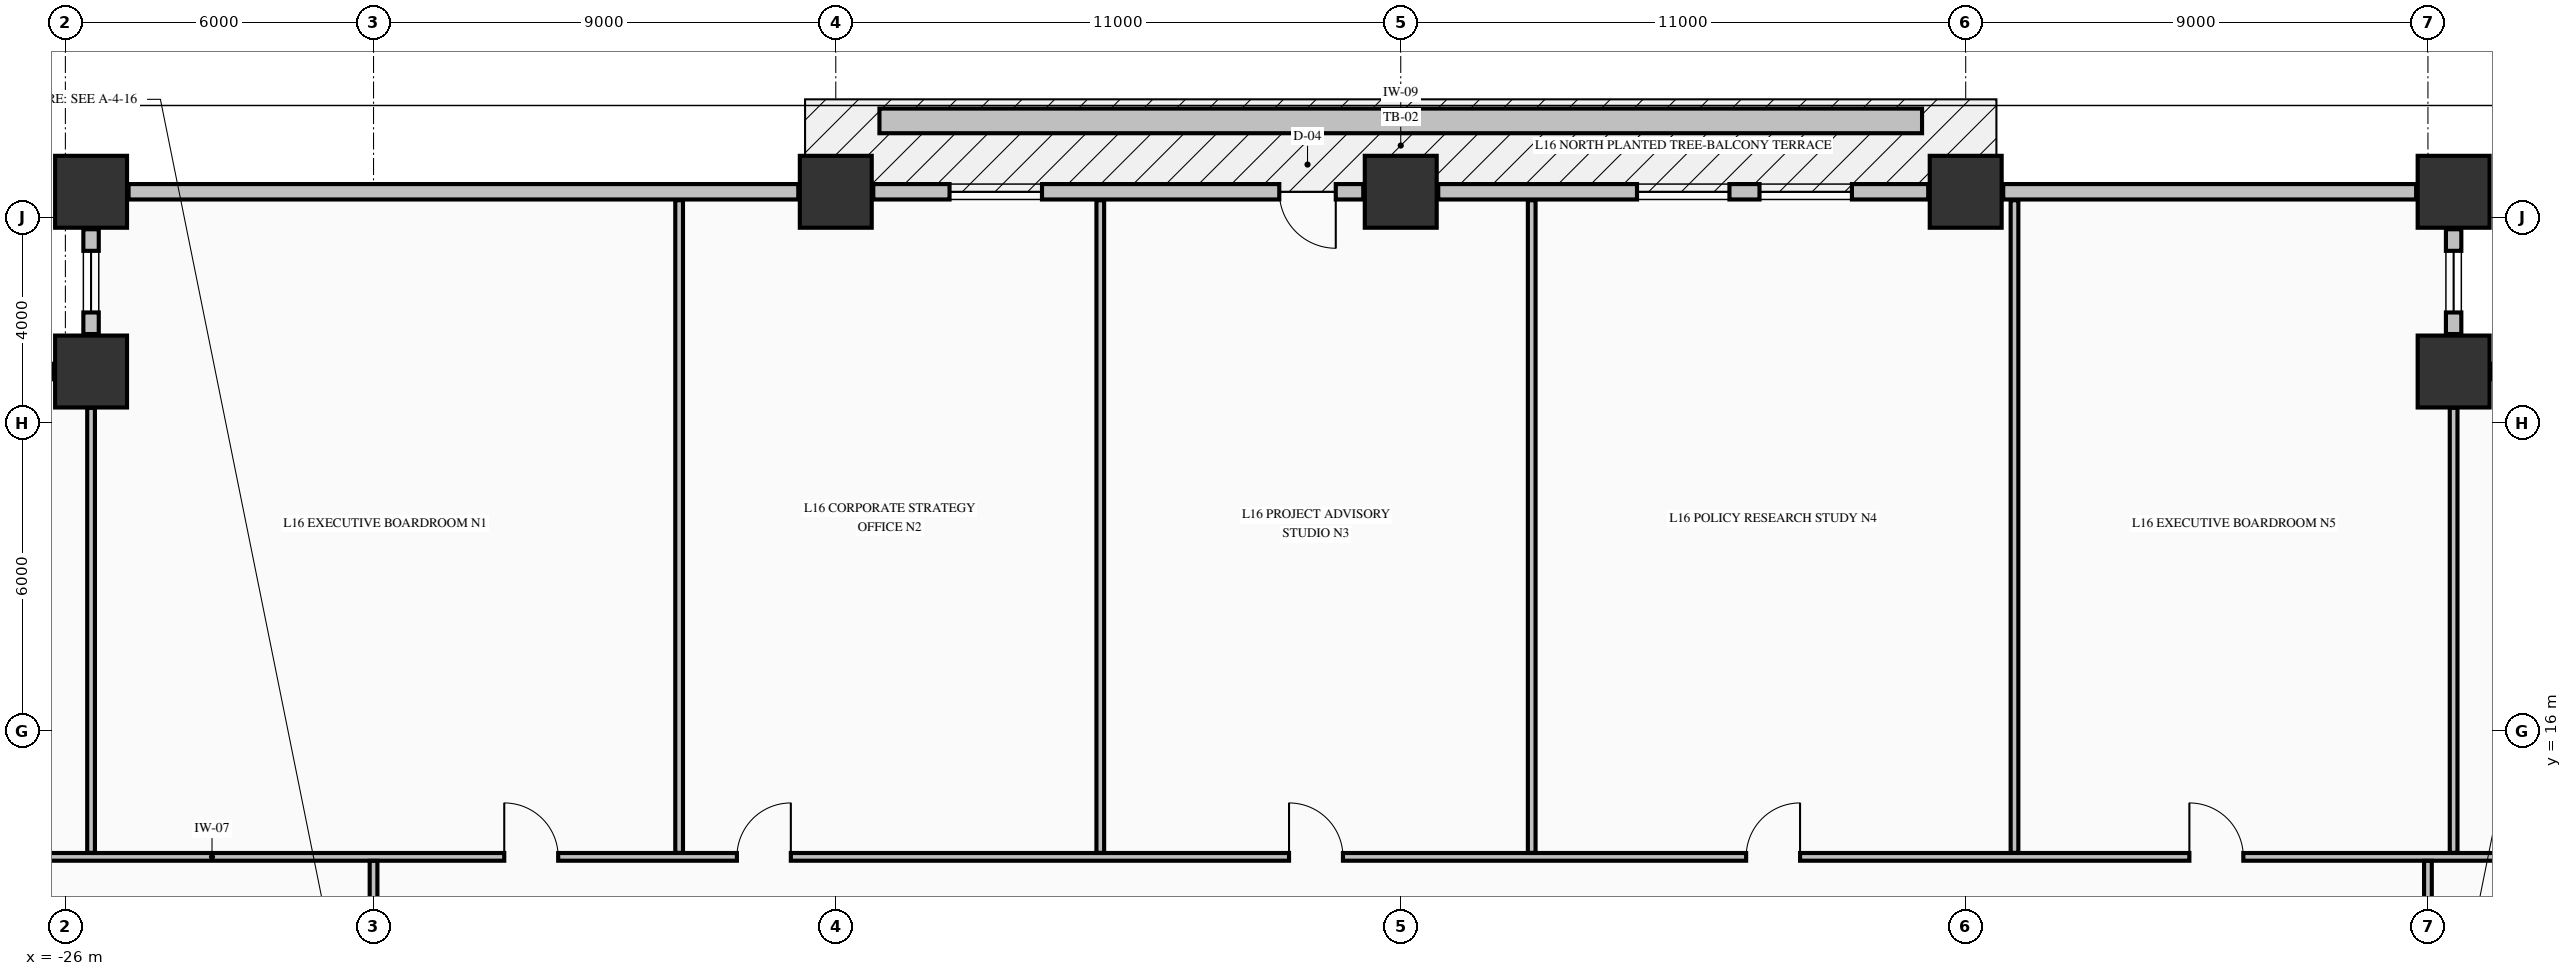
"""IFC4 building model, lengths in metres.
Left out: names, types, materials, properties, quantities, classifications, styles, units other than length and angle.
Written with IfcOpenShell. Run it as: python <this file> out.ifc"""

import sys

from ifc_helpers import new_model, si_unit, direction, frame, frame_2d, origin, origin_2d, place, context, subcontext, project, spatial, rectangle, extrude, element, fill, save


model = new_model("IFC4")
c1 = context("Model", 3, precision=1e-05, world=origin(), true_north=direction((0.0, 1.0)))
c2 = subcontext(c1, "Body", "Model", "MODEL_VIEW")
j1 = project(units=[si_unit("LENGTHUNIT", "METRE"), si_unit("PLANEANGLEUNIT", "RADIAN")], contexts=[c1])
p1 = place(None, origin())
s1 = spatial("IfcSite", under=j1, at=p1, CompositionType="ELEMENT")
p2 = place(p1, origin())
s2 = spatial("IfcBuilding", under=s1, at=p2, CompositionType="ELEMENT")
p3 = place(p2, frame((0.0, 0.0, 67.9)))
s3 = spatial("IfcBuildingStorey", under=s2, at=p3, CompositionType="ELEMENT", Elevation=67.9)
for number, where, z_axis, x_axis in (
    (1, (-25.5, 26.5, -0.25), (0.0, 0.0, 1.0), (1.0, 0.0, 0.0)),
    (2, (-11.0, 26.5, -0.25), (0.0, 0.0, 1.0), (1.0, 0.0, 0.0)),
    (3, (0.0, 26.5, -0.25), (0.0, 0.0, 1.0), (1.0, 0.0, 0.0)),
    (4, (11.0, 26.5, -0.25), (0.0, 0.0, 1.0), (1.0, 0.0, 0.0)),
    (5, (20.5, 26.5, -0.25), (0.0, 0.0, 1.0), (1.0, 0.0, 0.0)),
    (6, (20.5, 23.0, -0.25), (0.0, 0.0, 1.0), (1.0, 0.0, 0.0)),
    (7, (-25.5, 23.0, -0.25), (0.0, 0.0, 1.0), (1.0, 0.0, 0.0)),
):
    element("IfcColumn", number, at=place(p3, frame(where, z_axis=z_axis, x_axis=x_axis)), inside=s3, PredefinedType="COLUMN", context=c2, shape_type="SweptSolid", body=[
        extrude(rectangle(XDim=1.4, YDim=1.4, at=origin_2d()), origin(), (0.0, 0.0, 1.0), 3.495),
    ])
p4 = place(p3, frame((23.27, 23.0, 0.0), z_axis=(0.0, 0.0, 1.0), x_axis=(-1.0, 0.0, 0.0)))
e8 = element("IfcWall", 8, at=p4, inside=s3, PredefinedType="STANDARD", context=c2, shape_type="SweptSolid", body=[
    extrude(rectangle(XDim=2.04, YDim=0.3, at=frame_2d((1.02, 0.0))), origin(), (0.0, 0.0, 1.0), 2.637),
])
p5 = place(p4, frame((0.42, 0.0, 0.82)))
e9 = element("IfcOpeningElement", 9, at=p5, cuts=e8, PredefinedType="OPENING", context=c2, shape_type="SweptSolid", body=[
    extrude(rectangle(XDim=1.2, YDim=1.65, at=frame_2d((0.6, 0.825))), frame((0.0, 0.16, 0.0), z_axis=(0.0, -1.0, 0.0), x_axis=(1.0, 0.0, 0.0)), (0.0, 0.0, 1.0), 0.32),
])
p6 = place(p3, frame((20.5, 23.73, 0.0), z_axis=(0.0, 0.0, 1.0), x_axis=(0.0, 1.0, 0.0)))
e10 = element("IfcWall", 10, at=p6, inside=s3, PredefinedType="STANDARD", context=c2, shape_type="SweptSolid", body=[
    extrude(rectangle(XDim=2.04, YDim=0.3, at=frame_2d((1.02, 0.0))), origin(), (0.0, 0.0, 1.0), 2.637),
])
p7 = place(p6, frame((0.42, 0.0, 0.82)))
e11 = element("IfcOpeningElement", 11, at=p7, cuts=e10, PredefinedType="OPENING", context=c2, shape_type="SweptSolid", body=[
    extrude(rectangle(XDim=1.2, YDim=1.65, at=frame_2d((0.6, 0.825))), frame((0.0, 0.16, 0.0), z_axis=(0.0, -1.0, 0.0), x_axis=(1.0, 0.0, 0.0)), (0.0, 0.0, 1.0), 0.32),
])
p8 = place(p3, frame((-25.5, 25.77, 0.0), z_axis=(0.0, 0.0, 1.0), x_axis=(0.0, -1.0, 0.0)))
e12 = element("IfcWall", 12, at=p8, inside=s3, PredefinedType="STANDARD", context=c2, shape_type="SweptSolid", body=[
    extrude(rectangle(XDim=2.04, YDim=0.3, at=frame_2d((1.02, 0.0))), origin(), (0.0, 0.0, 1.0), 2.637),
])
p9 = place(p8, frame((0.42, 0.0, 0.82)))
e13 = element("IfcOpeningElement", 13, at=p9, cuts=e12, PredefinedType="OPENING", context=c2, shape_type="SweptSolid", body=[
    extrude(rectangle(XDim=1.2, YDim=1.65, at=frame_2d((0.6, 0.825))), frame((0.0, 0.16, 0.0), z_axis=(0.0, -1.0, 0.0), x_axis=(1.0, 0.0, 0.0)), (0.0, 0.0, 1.0), 0.32),
])
p10 = place(p3, frame((-26.23, 23.0, 0.0), z_axis=(0.0, 0.0, 1.0), x_axis=(-1.0, 0.0, 0.0)))
e14 = element("IfcWall", 14, at=p10, inside=s3, PredefinedType="STANDARD", context=c2, shape_type="SweptSolid", body=[
    extrude(rectangle(XDim=2.04, YDim=0.3, at=frame_2d((1.02, 0.0))), origin(), (0.0, 0.0, 1.0), 2.637),
])
p11 = place(p10, frame((0.42, 0.0, 0.82)))
e15 = element("IfcOpeningElement", 15, at=p11, cuts=e14, PredefinedType="OPENING", context=c2, shape_type="SweptSolid", body=[
    extrude(rectangle(XDim=1.2, YDim=1.65, at=frame_2d((0.6, 0.825))), frame((0.0, 0.16, 0.0), z_axis=(0.0, -1.0, 0.0), x_axis=(1.0, 0.0, 0.0)), (0.0, 0.0, 1.0), 0.32),
])
p12 = place(p3, frame((-11.73, 26.5, 0.0), z_axis=(0.0, 0.0, 1.0), x_axis=(-1.0, 0.0, 0.0)))
e16 = element("IfcWall", 16, at=p12, inside=s3, PredefinedType="STANDARD", context=c2, shape_type="SweptSolid", body=[
    extrude(rectangle(XDim=13.04, YDim=0.3, at=frame_2d((6.52, 0.0))), origin(), (0.0, 0.0, 1.0), 2.637),
])
p13 = place(p3, frame((-0.73, 26.5, 0.0), z_axis=(0.0, 0.0, 1.0), x_axis=(-1.0, 0.0, 0.0)))
e17 = element("IfcWall", 17, at=p13, inside=s3, PredefinedType="STANDARD", context=c2, shape_type="SweptSolid", body=[
    extrude(rectangle(XDim=9.54, YDim=0.3, at=frame_2d((4.77, 0.0))), origin(), (0.0, 0.0, 1.0), 2.637),
])
p14 = place(p13, frame((0.535, 0.0, 0.0)))
e18 = element("IfcOpeningElement", 18, at=p14, cuts=e17, PredefinedType="OPENING", context=c2, shape_type="SweptSolid", body=[
    extrude(rectangle(XDim=1.1, YDim=2.15, at=frame_2d((0.55, 1.075))), frame((0.0, 0.16, 0.0), z_axis=(0.0, -1.0, 0.0), x_axis=(1.0, 0.0, 0.0)), (0.0, 0.0, 1.0), 0.32),
])
p15 = place(p13, frame((6.255, 0.0, 0.78)))
e19 = element("IfcOpeningElement", 19, at=p15, cuts=e17, PredefinedType="OPENING", context=c2, shape_type="SweptSolid", body=[
    extrude(rectangle(XDim=1.8, YDim=1.72, at=frame_2d((0.9, 0.86))), frame((0.0, 0.16, 0.0), z_axis=(0.0, -1.0, 0.0), x_axis=(1.0, 0.0, 0.0)), (0.0, 0.0, 1.0), 0.32),
])
p16 = place(p3, frame((10.27, 26.5, 0.0), z_axis=(0.0, 0.0, 1.0), x_axis=(-1.0, 0.0, 0.0)))
e20 = element("IfcWall", 20, at=p16, inside=s3, PredefinedType="STANDARD", context=c2, shape_type="SweptSolid", body=[
    extrude(rectangle(XDim=9.54, YDim=0.3, at=frame_2d((4.77, 0.0))), origin(), (0.0, 0.0, 1.0), 2.637),
])
p17 = place(p16, frame((1.485, 0.0, 0.78)))
e21 = element("IfcOpeningElement", 21, at=p17, cuts=e20, PredefinedType="OPENING", context=c2, shape_type="SweptSolid", body=[
    extrude(rectangle(XDim=1.8, YDim=1.72, at=frame_2d((0.9, 0.86))), frame((0.0, 0.16, 0.0), z_axis=(0.0, -1.0, 0.0), x_axis=(1.0, 0.0, 0.0)), (0.0, 0.0, 1.0), 0.32),
])
p18 = place(p16, frame((3.87, 0.0, 0.78)))
e22 = element("IfcOpeningElement", 22, at=p18, cuts=e20, PredefinedType="OPENING", context=c2, shape_type="SweptSolid", body=[
    extrude(rectangle(XDim=1.8, YDim=1.72, at=frame_2d((0.9, 0.86))), frame((0.0, 0.16, 0.0), z_axis=(0.0, -1.0, 0.0), x_axis=(1.0, 0.0, 0.0)), (0.0, 0.0, 1.0), 0.32),
])
p19 = place(p3, frame((19.77, 26.5, 0.0), z_axis=(0.0, 0.0, 1.0), x_axis=(-1.0, 0.0, 0.0)))
e23 = element("IfcWall", 23, at=p19, inside=s3, PredefinedType="STANDARD", context=c2, shape_type="SweptSolid", body=[
    extrude(rectangle(XDim=8.04, YDim=0.3, at=frame_2d((4.02, 0.0))), origin(), (0.0, 0.0, 1.0), 2.637),
])
p20 = place(p3, frame((-28.835, 13.55, 0.0), z_axis=(0.0, 0.0, 1.0), x_axis=(1.0, 0.0, 0.0)))
e24 = element("IfcWall", 24, at=p20, inside=s3, PredefinedType="PARTITIONING", context=c2, shape_type="SweptSolid", body=[
    extrude(rectangle(XDim=52.67, YDim=0.15, at=frame_2d((26.335, 0.0))), origin(), (0.0, 0.0, 1.0), 3.245),
])
p21 = place(p20, frame((11.38, 0.0, 0.0)))
e25 = element("IfcOpeningElement", 25, at=p21, cuts=e24, PredefinedType="OPENING", context=c2, shape_type="SweptSolid", body=[
    extrude(rectangle(XDim=1.05, YDim=2.15, at=frame_2d((0.525, 1.075))), frame((0.0, 0.085, 0.0), z_axis=(0.0, -1.0, 0.0), x_axis=(1.0, 0.0, 0.0)), (0.0, 0.0, 1.0), 0.17),
])
p22 = place(p20, frame((15.91, 0.0, 0.0)))
e26 = element("IfcOpeningElement", 26, at=p22, cuts=e24, PredefinedType="OPENING", context=c2, shape_type="SweptSolid", body=[
    extrude(rectangle(XDim=1.05, YDim=2.15, at=frame_2d((0.525, 1.075))), frame((0.0, 0.085, 0.0), z_axis=(0.0, -1.0, 0.0), x_axis=(1.0, 0.0, 0.0)), (0.0, 0.0, 1.0), 0.17),
])
p23 = place(p20, frame((26.66, 0.0, 0.0)))
e27 = element("IfcOpeningElement", 27, at=p23, cuts=e24, PredefinedType="OPENING", context=c2, shape_type="SweptSolid", body=[
    extrude(rectangle(XDim=1.05, YDim=2.15, at=frame_2d((0.525, 1.075))), frame((0.0, 0.085, 0.0), z_axis=(0.0, -1.0, 0.0), x_axis=(1.0, 0.0, 0.0)), (0.0, 0.0, 1.0), 0.17),
])
p24 = place(p20, frame((35.56, 0.0, 0.0)))
e28 = element("IfcOpeningElement", 28, at=p24, cuts=e24, PredefinedType="OPENING", context=c2, shape_type="SweptSolid", body=[
    extrude(rectangle(XDim=1.05, YDim=2.15, at=frame_2d((0.525, 1.075))), frame((0.0, 0.085, 0.0), z_axis=(0.0, -1.0, 0.0), x_axis=(1.0, 0.0, 0.0)), (0.0, 0.0, 1.0), 0.17),
])
p25 = place(p20, frame((44.19, 0.0, 0.0)))
e29 = element("IfcOpeningElement", 29, at=p25, cuts=e24, PredefinedType="OPENING", context=c2, shape_type="SweptSolid", body=[
    extrude(rectangle(XDim=1.05, YDim=2.15, at=frame_2d((0.525, 1.075))), frame((0.0, 0.085, 0.0), z_axis=(0.0, -1.0, 0.0), x_axis=(1.0, 0.0, 0.0)), (0.0, 0.0, 1.0), 0.17),
])
p26 = place(p3, frame((-25.5, 13.628, 0.0), z_axis=(0.0, 0.0, 1.0), x_axis=(0.0, 1.0, 0.0)))
e30 = element("IfcWall", 30, at=p26, inside=s3, PredefinedType="PARTITIONING", context=c2, shape_type="SweptSolid", body=[
    extrude(rectangle(XDim=8.666, YDim=0.15, at=frame_2d((4.333, 0.0))), origin(), (0.0, 0.0, 1.0), 3.245),
])
p27 = place(p3, frame((-20.0, 11.106, 0.0), z_axis=(0.0, 0.0, 1.0), x_axis=(0.0, 1.0, 0.0)))
e31 = element("IfcWall", 31, at=p27, inside=s3, PredefinedType="PARTITIONING", context=c2, shape_type="SweptSolid", body=[
    extrude(rectangle(XDim=2.366, YDim=0.15, at=frame_2d((1.183, 0.0))), origin(), (0.0, 0.0, 1.0), 2.585),
])
p28 = place(p27, frame((0.449, 0.0, 0.0)))
e32 = element("IfcOpeningElement", 32, at=p28, cuts=e31, PredefinedType="OPENING", context=c2, shape_type="SweptSolid", body=[
    extrude(rectangle(XDim=0.95, YDim=2.15, at=frame_2d((0.475, 1.075))), frame((0.0, 0.085, 0.0), z_axis=(0.0, -1.0, 0.0), x_axis=(1.0, 0.0, 0.0)), (0.0, 0.0, 1.0), 0.17),
])
for number, where, z_axis, x_axis in (
    (33, (-14.05, 13.628, 0.0), (0.0, 0.0, 1.0), (0.0, 1.0, 0.0)),
    (34, (-5.85, 13.628, 0.0), (0.0, 0.0, 1.0), (0.0, 1.0, 0.0)),
    (35, (2.55, 13.628, 0.0), (0.0, 0.0, 1.0), (0.0, 1.0, 0.0)),
    (36, (11.95, 13.628, 0.0), (0.0, 0.0, 1.0), (0.0, 1.0, 0.0)),
):
    element("IfcWall", number, at=place(p3, frame(where, z_axis=z_axis, x_axis=x_axis)), inside=s3, PredefinedType="PARTITIONING", context=c2, shape_type="SweptSolid", body=[
        extrude(rectangle(XDim=12.707, YDim=0.15, at=frame_2d((6.354, 0.0))), origin(), (0.0, 0.0, 1.0), 3.245),
    ])
p29 = place(p3, frame((20.0, 11.106, 0.0), z_axis=(0.0, 0.0, 1.0), x_axis=(0.0, 1.0, 0.0)))
e37 = element("IfcWall", 37, at=p29, inside=s3, PredefinedType="PARTITIONING", context=c2, shape_type="SweptSolid", body=[
    extrude(rectangle(XDim=2.366, YDim=0.15, at=frame_2d((1.183, 0.0))), origin(), (0.0, 0.0, 1.0), 3.245),
])
p30 = place(p29, frame((0.449, 0.0, 0.0)))
e38 = element("IfcOpeningElement", 38, at=p30, cuts=e37, PredefinedType="OPENING", context=c2, shape_type="SweptSolid", body=[
    extrude(rectangle(XDim=0.95, YDim=2.15, at=frame_2d((0.475, 1.075))), frame((0.0, 0.085, 0.0), z_axis=(0.0, -1.0, 0.0), x_axis=(1.0, 0.0, 0.0)), (0.0, 0.0, 1.0), 0.17),
])
p31 = place(p3, frame((20.5, 13.628, 0.0), z_axis=(0.0, 0.0, 1.0), x_axis=(0.0, 1.0, 0.0)))
e39 = element("IfcWall", 39, at=p31, inside=s3, PredefinedType="PARTITIONING", context=c2, shape_type="SweptSolid", body=[
    extrude(rectangle(XDim=8.666, YDim=0.15, at=frame_2d((4.333, 0.0))), origin(), (0.0, 0.0, 1.0), 3.245),
])
p32 = place(p3, frame((-10.15, 27.88, -0.04), z_axis=(0.0, 0.0, 1.0), x_axis=(1.0, 0.0, 0.0)))
e40 = element("IfcWall", 40, at=p32, inside=s3, PredefinedType="PARAPET", context=c2, shape_type="SweptSolid", body=[
    extrude(rectangle(XDim=20.3, YDim=0.48, at=frame_2d((10.15, 0.0))), origin(), (0.0, 0.0, 1.0), 0.52),
])
p33 = place(p7, origin())
e41 = element("IfcWindow", 41, at=p33, inside=s3, PartitioningType="SINGLE_PANEL", PredefinedType="WINDOW", context=c2, shape_type="SweptSolid", body=[
    extrude(rectangle(XDim=1.2, YDim=1.65, at=frame_2d((0.6, 0.825))), frame((0.0, 0.03, 0.0), z_axis=(0.0, -1.0, 0.0), x_axis=(1.0, 0.0, 0.0)), (0.0, 0.0, 1.0), 0.06),
])
fill(e11, e41)
p34 = place(p9, origin())
e42 = element("IfcWindow", 42, at=p34, inside=s3, PartitioningType="SINGLE_PANEL", PredefinedType="WINDOW", context=c2, shape_type="SweptSolid", body=[
    extrude(rectangle(XDim=1.2, YDim=1.65, at=frame_2d((0.6, 0.825))), frame((0.0, 0.03, 0.0), z_axis=(0.0, -1.0, 0.0), x_axis=(1.0, 0.0, 0.0)), (0.0, 0.0, 1.0), 0.06),
])
fill(e13, e42)
p35 = place(p14, origin())
e43 = element("IfcDoor", 43, at=p35, inside=s3, OperationType="SINGLE_SWING_LEFT", PredefinedType="DOOR", context=c2, shape_type="SweptSolid", body=[
    extrude(rectangle(XDim=1.1, YDim=2.15, at=frame_2d((0.55, 1.075))), frame((0.0, 0.025, 0.0), z_axis=(0.0, -1.0, 0.0), x_axis=(1.0, 0.0, 0.0)), (0.0, 0.0, 1.0), 0.05),
])
fill(e18, e43)
p36 = place(p15, origin())
e44 = element("IfcWindow", 44, at=p36, inside=s3, PartitioningType="SINGLE_PANEL", PredefinedType="WINDOW", context=c2, shape_type="SweptSolid", body=[
    extrude(rectangle(XDim=1.8, YDim=1.72, at=frame_2d((0.9, 0.86))), frame((0.0, 0.03, 0.0), z_axis=(0.0, -1.0, 0.0), x_axis=(1.0, 0.0, 0.0)), (0.0, 0.0, 1.0), 0.06),
])
fill(e19, e44)
p37 = place(p17, origin())
e45 = element("IfcWindow", 45, at=p37, inside=s3, PartitioningType="SINGLE_PANEL", PredefinedType="WINDOW", context=c2, shape_type="SweptSolid", body=[
    extrude(rectangle(XDim=1.8, YDim=1.72, at=frame_2d((0.9, 0.86))), frame((0.0, 0.03, 0.0), z_axis=(0.0, -1.0, 0.0), x_axis=(1.0, 0.0, 0.0)), (0.0, 0.0, 1.0), 0.06),
])
fill(e21, e45)
p38 = place(p18, origin())
e46 = element("IfcWindow", 46, at=p38, inside=s3, PartitioningType="SINGLE_PANEL", PredefinedType="WINDOW", context=c2, shape_type="SweptSolid", body=[
    extrude(rectangle(XDim=1.8, YDim=1.72, at=frame_2d((0.9, 0.86))), frame((0.0, 0.03, 0.0), z_axis=(0.0, -1.0, 0.0), x_axis=(1.0, 0.0, 0.0)), (0.0, 0.0, 1.0), 0.06),
])
fill(e22, e46)
p39 = place(p21, origin())
e47 = element("IfcDoor", 47, at=p39, inside=s3, OperationType="SINGLE_SWING_LEFT", PredefinedType="DOOR", context=c2, shape_type="SweptSolid", body=[
    extrude(rectangle(XDim=1.05, YDim=2.15, at=frame_2d((0.525, 1.075))), frame((0.0, 0.025, 0.0), z_axis=(0.0, -1.0, 0.0), x_axis=(1.0, 0.0, 0.0)), (0.0, 0.0, 1.0), 0.05),
])
fill(e25, e47)
p40 = place(p22, origin())
e48 = element("IfcDoor", 48, at=p40, inside=s3, OperationType="SINGLE_SWING_RIGHT", PredefinedType="DOOR", context=c2, shape_type="SweptSolid", body=[
    extrude(rectangle(XDim=1.05, YDim=2.15, at=frame_2d((0.525, 1.075))), frame((0.0, 0.025, 0.0), z_axis=(0.0, -1.0, 0.0), x_axis=(1.0, 0.0, 0.0)), (0.0, 0.0, 1.0), 0.05),
])
fill(e26, e48)
p41 = place(p23, origin())
e49 = element("IfcDoor", 49, at=p41, inside=s3, OperationType="SINGLE_SWING_LEFT", PredefinedType="DOOR", context=c2, shape_type="SweptSolid", body=[
    extrude(rectangle(XDim=1.05, YDim=2.15, at=frame_2d((0.525, 1.075))), frame((0.0, 0.025, 0.0), z_axis=(0.0, -1.0, 0.0), x_axis=(1.0, 0.0, 0.0)), (0.0, 0.0, 1.0), 0.05),
])
fill(e27, e49)
p42 = place(p24, origin())
e50 = element("IfcDoor", 50, at=p42, inside=s3, OperationType="SINGLE_SWING_RIGHT", PredefinedType="DOOR", context=c2, shape_type="SweptSolid", body=[
    extrude(rectangle(XDim=1.05, YDim=2.15, at=frame_2d((0.525, 1.075))), frame((0.0, 0.025, 0.0), z_axis=(0.0, -1.0, 0.0), x_axis=(1.0, 0.0, 0.0)), (0.0, 0.0, 1.0), 0.05),
])
fill(e28, e50)
p43 = place(p25, origin())
e51 = element("IfcDoor", 51, at=p43, inside=s3, OperationType="SINGLE_SWING_LEFT", PredefinedType="DOOR", context=c2, shape_type="SweptSolid", body=[
    extrude(rectangle(XDim=1.05, YDim=2.15, at=frame_2d((0.525, 1.075))), frame((0.0, 0.025, 0.0), z_axis=(0.0, -1.0, 0.0), x_axis=(1.0, 0.0, 0.0)), (0.0, 0.0, 1.0), 0.05),
])
fill(e29, e51)
save(model, sys.argv[1])
